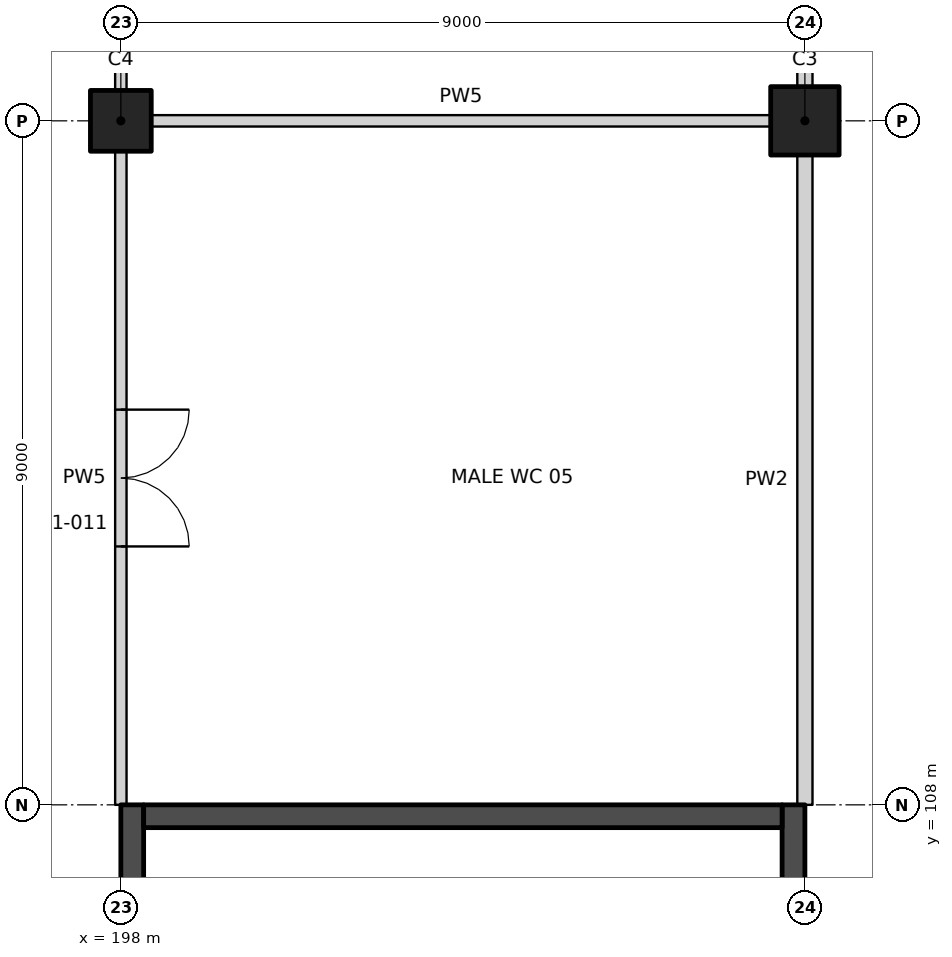
"""IFC4 building model, lengths in metres.
Left out: names, types, materials, properties, quantities, classifications, styles, units other than length and angle.
Written with IfcOpenShell. Run it as: python <this file> out.ifc"""

import sys

from ifc_helpers import new_model, si_unit, direction, frame, frame_2d, origin, origin_2d, place, context, subcontext, project, spatial, rectangle, extrude, element, fill, save


model = new_model("IFC4")
c1 = context("Model", 3, precision=1e-05, world=origin(), true_north=direction((0.0, 1.0)))
c2 = subcontext(c1, "Body", "Model", "MODEL_VIEW")
j1 = project(units=[si_unit("LENGTHUNIT", "METRE"), si_unit("PLANEANGLEUNIT", "RADIAN")], contexts=[c1])
p1 = place(None, origin())
s1 = spatial("IfcSite", under=j1, at=p1, CompositionType="ELEMENT")
p2 = place(p1, origin())
s2 = spatial("IfcBuilding", under=s1, at=p2, CompositionType="ELEMENT")
p3 = place(p2, frame((0.0, 0.0, 7.0)))
s3 = spatial("IfcBuildingStorey", under=s2, at=p3, CompositionType="ELEMENT", Elevation=7.0)
p4 = place(p3, frame((207.0, 117.0, 0.0), z_axis=(0.0, 0.0, 1.0), x_axis=(1.0, 0.0, 0.0)))
e1 = element("IfcColumn", 1, at=p4, inside=s3, PredefinedType="COLUMN", context=c2, shape_type="SweptSolid", body=[
    extrude(rectangle(XDim=0.9, YDim=0.9, at=origin_2d()), origin(), (0.0, 0.0, 1.0), 4.5),
])
p5 = place(p3, frame((198.0, 117.0, 0.0), z_axis=(0.0, 0.0, 1.0), x_axis=(1.0, 0.0, 0.0)))
e2 = element("IfcColumn", 2, at=p5, inside=s3, PredefinedType="COLUMN", context=c2, shape_type="SweptSolid", body=[
    extrude(rectangle(XDim=0.8, YDim=0.8, at=origin_2d()), origin(), (0.0, 0.0, 1.0), 4.5),
])
p6 = place(p3, frame((198.4, 117.0, 0.0), z_axis=(0.0, 0.0, 1.0), x_axis=(1.0, 0.0, 0.0)))
e3 = element("IfcWall", 3, at=p6, inside=s3, PredefinedType="PARTITIONING", context=c2, shape_type="SweptSolid", body=[
    extrude(rectangle(XDim=8.15, YDim=0.15, at=frame_2d((4.075, 0.0))), origin(), (0.0, 0.0, 1.0), 3.25),
])
p7 = place(p3, frame((198.0, 108.0, 0.0), z_axis=(0.0, 0.0, 1.0), x_axis=(0.0, 1.0, 0.0)))
e4 = element("IfcWall", 4, at=p7, inside=s3, PredefinedType="PARTITIONING", context=c2, shape_type="SweptSolid", body=[
    extrude(rectangle(XDim=8.6, YDim=0.15, at=frame_2d((4.3, 0.0))), origin(), (0.0, 0.0, 1.0), 3.15),
])
p8 = place(p7, frame((3.4, 0.0, 0.0)))
e5 = element("IfcOpeningElement", 5, at=p8, cuts=e4, PredefinedType="OPENING", context=c2, shape_type="SweptSolid", body=[
    extrude(rectangle(XDim=1.8, YDim=2.1, at=frame_2d((0.9, 1.05))), frame((0.0, 0.085, 0.0), z_axis=(0.0, -1.0, 0.0), x_axis=(1.0, 0.0, 0.0)), (0.0, 0.0, 1.0), 0.17),
])
p9 = place(p3, frame((198.0, 117.4, 0.0), z_axis=(0.0, 0.0, 1.0), x_axis=(0.0, 1.0, 0.0)))
e6 = element("IfcWall", 6, at=p9, inside=s3, PredefinedType="PARTITIONING", context=c2, shape_type="SweptSolid", body=[
    extrude(rectangle(XDim=8.2, YDim=0.15, at=frame_2d((4.1, 0.0))), origin(), (0.0, 0.0, 1.0), 3.25),
])
p10 = place(p9, frame((3.2, 0.0, 0.0)))
e7 = element("IfcOpeningElement", 7, at=p10, cuts=e6, PredefinedType="OPENING", context=c2, shape_type="SweptSolid", body=[
    extrude(rectangle(XDim=1.8, YDim=2.1, at=frame_2d((0.9, 1.05))), frame((0.0, 0.085, 0.0), z_axis=(0.0, -1.0, 0.0), x_axis=(1.0, 0.0, 0.0)), (0.0, 0.0, 1.0), 0.17),
])
p11 = place(p3, frame((207.0, 108.0, 0.0), z_axis=(0.0, 0.0, 1.0), x_axis=(0.0, 1.0, 0.0)))
e8 = element("IfcWall", 8, at=p11, inside=s3, PredefinedType="PARTITIONING", context=c2, shape_type="SweptSolid", body=[
    extrude(rectangle(XDim=8.55, YDim=0.2, at=frame_2d((4.275, 0.0))), origin(), (0.0, 0.0, 1.0), 3.25),
])
p12 = place(p3, frame((207.0, 117.45, 0.0), z_axis=(0.0, 0.0, 1.0), x_axis=(0.0, 1.0, 0.0)))
e9 = element("IfcWall", 9, at=p12, inside=s3, PredefinedType="PARTITIONING", context=c2, shape_type="SweptSolid", body=[
    extrude(rectangle(XDim=8.1, YDim=0.2, at=frame_2d((4.05, 0.0))), origin(), (0.0, 0.0, 1.0), 3.25),
])
p13 = place(p3, frame((198.15, 108.0, 0.0), z_axis=(0.0, 0.0, 1.0), x_axis=(0.0, -1.0, 0.0)))
e10 = element("IfcWall", 10, at=p13, inside=s3, PredefinedType="SHEAR", context=c2, shape_type="SweptSolid", body=[
    extrude(rectangle(XDim=18.0, YDim=0.3, at=frame_2d((9.0, 0.0))), origin(), (0.0, 0.0, 1.0), 4.5),
])
p14 = place(p13, frame((1.5, 0.0, 0.0)))
e11 = element("IfcOpeningElement", 11, at=p14, cuts=e10, PredefinedType="OPENING", context=c2, shape_type="SweptSolid", body=[
    extrude(rectangle(XDim=1.2, YDim=2.1, at=frame_2d((0.6, 1.05))), frame((0.0, 0.16, 0.0), z_axis=(0.0, -1.0, 0.0), x_axis=(1.0, 0.0, 0.0)), (0.0, 0.0, 1.0), 0.32),
])
p15 = place(p3, frame((206.85, 108.0, 0.0), z_axis=(0.0, 0.0, 1.0), x_axis=(0.0, -1.0, 0.0)))
e12 = element("IfcWall", 12, at=p15, inside=s3, PredefinedType="SHEAR", context=c2, shape_type="SweptSolid", body=[
    extrude(rectangle(XDim=18.0, YDim=0.3, at=frame_2d((9.0, 0.0))), origin(), (0.0, 0.0, 1.0), 4.5),
])
p16 = place(p3, frame((198.3, 107.85, 0.0), z_axis=(0.0, 0.0, 1.0), x_axis=(1.0, 0.0, 0.0)))
e13 = element("IfcWall", 13, at=p16, inside=s3, PredefinedType="SHEAR", context=c2, shape_type="SweptSolid", body=[
    extrude(rectangle(XDim=8.4, YDim=0.3, at=frame_2d((4.2, 0.0))), origin(), (0.0, 0.0, 1.0), 4.5),
])
p17 = place(p8, frame((1.8, 0.0, 0.0), z_axis=(0.0, 0.0, 1.0), x_axis=(-1.0, 0.0, 0.0)))
e14 = element("IfcDoor", 14, at=p17, inside=s3, OperationType="DOUBLE_DOOR_DOUBLE_SWING", PredefinedType="DOOR", context=c2, shape_type="SweptSolid", body=[
    extrude(rectangle(XDim=1.8, YDim=2.1, at=frame_2d((0.9, 1.05))), frame((0.0, 0.025, 0.0), z_axis=(0.0, -1.0, 0.0), x_axis=(1.0, 0.0, 0.0)), (0.0, 0.0, 1.0), 0.05),
])
fill(e5, e14)
save(model, sys.argv[1])
